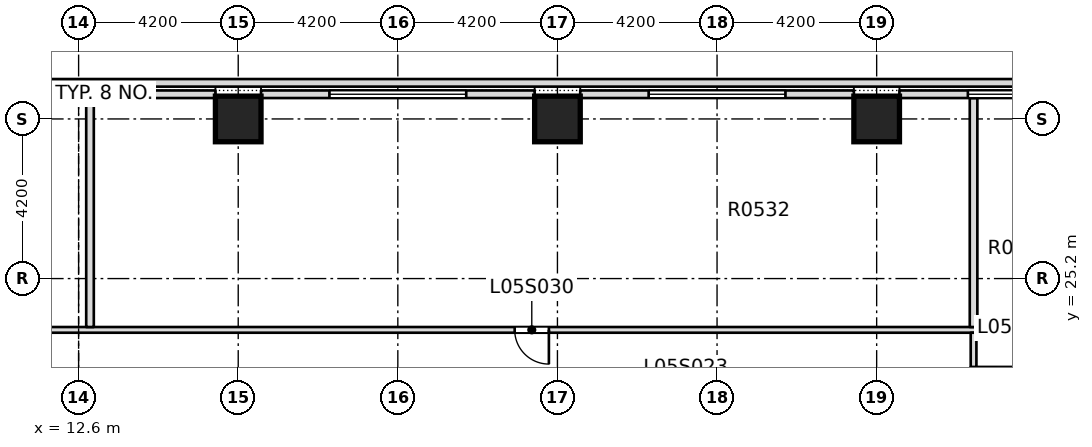
"""IFC4 building model, lengths in metres.
Left out: names, types, materials, properties, quantities, classifications, styles, units other than length and angle.
Written with IfcOpenShell. Run it as: python <this file> out.ifc"""

import sys

from ifc_helpers import new_model, si_unit, direction, frame, frame_2d, origin, origin_2d, place, context, subcontext, project, spatial, rectangle, extrude, element, fill, save


model = new_model("IFC4")
c1 = context("Model", 3, precision=1e-05, world=origin(), true_north=direction((0.0, 1.0)))
c2 = subcontext(c1, "Body", "Model", "MODEL_VIEW")
j1 = project(units=[si_unit("LENGTHUNIT", "METRE"), si_unit("PLANEANGLEUNIT", "RADIAN")], contexts=[c1])
p1 = place(None, origin())
s1 = spatial("IfcSite", under=j1, at=p1, CompositionType="ELEMENT")
p2 = place(p1, origin())
s2 = spatial("IfcBuilding", under=s1, at=p2, CompositionType="ELEMENT")
p3 = place(p2, frame((0.0, 0.0, 30.0)))
s3 = spatial("IfcBuildingStorey", under=s2, at=p3, CompositionType="ELEMENT", Elevation=30.0)
for number, where, z_axis, x_axis in (
    (1, (16.8, 29.4, 0.0), (0.0, 0.0, 1.0), (1.0, 0.0, 0.0)),
    (2, (25.2, 29.4, 0.0), (0.0, 0.0, 1.0), (1.0, 0.0, 0.0)),
    (3, (33.6, 29.4, 0.0), (0.0, 0.0, 1.0), (1.0, 0.0, 0.0)),
):
    element("IfcColumn", number, at=place(p3, frame(where, z_axis=z_axis, x_axis=x_axis)), inside=s3, PredefinedType="COLUMN", context=c2, shape_type="SweptSolid", body=[
        extrude(rectangle(XDim=1.2, YDim=1.2, at=origin_2d()), origin(), (0.0, 0.0, 1.0), 4.18),
    ])
p4 = place(p3, frame((-26.25, 30.35, 4.5), z_axis=(0.0, 0.0, 1.0), x_axis=(1.0, 0.0, 0.0)))
e4 = element("IfcWall", 4, at=p4, inside=s3, PredefinedType="PARAPET", context=c2, shape_type="SweptSolid", body=[
    extrude(rectangle(XDim=69.3, YDim=0.2, at=frame_2d((34.65, 0.0))), origin(), (0.0, 0.0, 1.0), 1.2),
])
p5 = place(p3, frame((36.075, 22.8, 0.0), z_axis=(0.0, 0.0, 1.0), x_axis=(1.0, 0.0, 0.0)))
e5 = element("IfcWall", 5, at=p5, inside=s3, PredefinedType="PARTITIONING", context=c2, shape_type="SweptSolid", body=[
    extrude(rectangle(XDim=6.475, YDim=0.15, at=frame_2d((3.238, 0.0))), origin(), (0.0, 0.0, 1.0), 4.18),
])
p6 = place(p5, frame((0.675, 0.0, 0.0)))
e6 = element("IfcOpeningElement", 6, at=p6, cuts=e5, PredefinedType="OPENING", context=c2, shape_type="SweptSolid", body=[
    extrude(rectangle(XDim=1.2, YDim=2.1, at=frame_2d((0.6, 1.05))), frame((0.0, 0.085, 0.0), z_axis=(0.0, -1.0, 0.0), x_axis=(1.0, 0.0, 0.0)), (0.0, 0.0, 1.0), 0.17),
])
p7 = place(p3, frame((8.65, 23.85, 0.0), z_axis=(0.0, 0.0, 1.0), x_axis=(1.0, 0.0, 0.0)))
e7 = element("IfcWall", 7, at=p7, inside=s3, PredefinedType="PARTITIONING", context=c2, shape_type="SweptSolid", body=[
    extrude(rectangle(XDim=27.6, YDim=0.15, at=frame_2d((13.8, 0.0))), origin(), (0.0, 0.0, 1.0), 4.18),
])
p8 = place(p7, frame((1.7, 0.0, 0.0)))
e8 = element("IfcOpeningElement", 8, at=p8, cuts=e7, PredefinedType="OPENING", context=c2, shape_type="SweptSolid", body=[
    extrude(rectangle(XDim=0.9, YDim=2.1, at=frame_2d((0.45, 1.05))), frame((0.0, 0.085, 0.0), z_axis=(0.0, -1.0, 0.0), x_axis=(1.0, 0.0, 0.0)), (0.0, 0.0, 1.0), 0.17),
])
p9 = place(p7, frame((15.425, 0.0, 0.0)))
e9 = element("IfcOpeningElement", 9, at=p9, cuts=e7, PredefinedType="OPENING", context=c2, shape_type="SweptSolid", body=[
    extrude(rectangle(XDim=0.9, YDim=2.1, at=frame_2d((0.45, 1.05))), frame((0.0, 0.085, 0.0), z_axis=(0.0, -1.0, 0.0), x_axis=(1.0, 0.0, 0.0)), (0.0, 0.0, 1.0), 0.17),
])
p10 = place(p3, frame((12.9, 23.925, 0.0), z_axis=(0.0, 0.0, 1.0), x_axis=(0.0, 1.0, 0.0)))
e10 = element("IfcWall", 10, at=p10, inside=s3, PredefinedType="PARTITIONING", context=c2, shape_type="SweptSolid", body=[
    extrude(rectangle(XDim=6.025, YDim=0.2, at=frame_2d((3.012, 0.0))), origin(), (0.0, 0.0, 1.0), 4.18),
])
p11 = place(p3, frame((36.15, 22.875, 0.0), z_axis=(0.0, 0.0, 1.0), x_axis=(0.0, 1.0, 0.0)))
e11 = element("IfcWall", 11, at=p11, inside=s3, PredefinedType="PARTITIONING", context=c2, shape_type="SweptSolid", body=[
    extrude(rectangle(XDim=0.9, YDim=0.15, at=frame_2d((0.45, 0.0))), origin(), (0.0, 0.0, 1.0), 4.18),
])
p12 = place(p3, frame((36.15, 23.925, 0.0), z_axis=(0.0, 0.0, 1.0), x_axis=(0.0, 1.0, 0.0)))
e12 = element("IfcWall", 12, at=p12, inside=s3, PredefinedType="PARTITIONING", context=c2, shape_type="SweptSolid", body=[
    extrude(rectangle(XDim=6.025, YDim=0.2, at=frame_2d((3.012, 0.0))), origin(), (0.0, 0.0, 1.0), 4.18),
])
p13 = place(p3, frame((41.4, 30.05, 0.0), z_axis=(0.0, 0.0, 1.0), x_axis=(-1.0, 0.0, 0.0)))
e13 = element("IfcWall", 13, at=p13, inside=s3, PredefinedType="STANDARD", context=c2, shape_type="SweptSolid", body=[
    extrude(rectangle(XDim=7.2, YDim=0.2, at=frame_2d((3.6, 0.0))), origin(), (0.0, 0.0, 1.0), 4.18),
])
p14 = place(p13, frame((1.8, 0.0, 0.9)))
e14 = element("IfcOpeningElement", 14, at=p14, cuts=e13, PredefinedType="OPENING", context=c2, shape_type="SweptSolid", body=[
    extrude(rectangle(XDim=3.6, YDim=2.4, at=frame_2d((1.8, 1.2))), frame((0.0, 0.11, 0.0), z_axis=(0.0, -1.0, 0.0), x_axis=(1.0, 0.0, 0.0)), (0.0, 0.0, 1.0), 0.22),
])
p15 = place(p3, frame((33.0, 30.05, 0.0), z_axis=(0.0, 0.0, 1.0), x_axis=(-1.0, 0.0, 0.0)))
e15 = element("IfcWall", 15, at=p15, inside=s3, PredefinedType="STANDARD", context=c2, shape_type="SweptSolid", body=[
    extrude(rectangle(XDim=7.2, YDim=0.2, at=frame_2d((3.6, 0.0))), origin(), (0.0, 0.0, 1.0), 4.18),
])
p16 = place(p15, frame((1.8, 0.0, 0.9)))
e16 = element("IfcOpeningElement", 16, at=p16, cuts=e15, PredefinedType="OPENING", context=c2, shape_type="SweptSolid", body=[
    extrude(rectangle(XDim=3.6, YDim=2.4, at=frame_2d((1.8, 1.2))), frame((0.0, 0.11, 0.0), z_axis=(0.0, -1.0, 0.0), x_axis=(1.0, 0.0, 0.0)), (0.0, 0.0, 1.0), 0.22),
])
p17 = place(p3, frame((24.6, 30.05, 0.0), z_axis=(0.0, 0.0, 1.0), x_axis=(-1.0, 0.0, 0.0)))
e17 = element("IfcWall", 17, at=p17, inside=s3, PredefinedType="STANDARD", context=c2, shape_type="SweptSolid", body=[
    extrude(rectangle(XDim=7.2, YDim=0.2, at=frame_2d((3.6, 0.0))), origin(), (0.0, 0.0, 1.0), 4.18),
])
p18 = place(p17, frame((1.8, 0.0, 0.9)))
e18 = element("IfcOpeningElement", 18, at=p18, cuts=e17, PredefinedType="OPENING", context=c2, shape_type="SweptSolid", body=[
    extrude(rectangle(XDim=3.6, YDim=2.4, at=frame_2d((1.8, 1.2))), frame((0.0, 0.11, 0.0), z_axis=(0.0, -1.0, 0.0), x_axis=(1.0, 0.0, 0.0)), (0.0, 0.0, 1.0), 0.22),
])
p19 = place(p3, frame((16.2, 30.05, 0.0), z_axis=(0.0, 0.0, 1.0), x_axis=(-1.0, 0.0, 0.0)))
e19 = element("IfcWall", 19, at=p19, inside=s3, PredefinedType="STANDARD", context=c2, shape_type="SweptSolid", body=[
    extrude(rectangle(XDim=7.2, YDim=0.2, at=frame_2d((3.6, 0.0))), origin(), (0.0, 0.0, 1.0), 4.18),
])
p20 = place(p19, frame((1.8, 0.0, 0.9)))
e20 = element("IfcOpeningElement", 20, at=p20, cuts=e19, PredefinedType="OPENING", context=c2, shape_type="SweptSolid", body=[
    extrude(rectangle(XDim=3.6, YDim=2.4, at=frame_2d((1.8, 1.2))), frame((0.0, 0.11, 0.0), z_axis=(0.0, -1.0, 0.0), x_axis=(1.0, 0.0, 0.0)), (0.0, 0.0, 1.0), 0.22),
])
p21 = place(p9, origin())
e21 = element("IfcDoor", 21, at=p21, inside=s3, OperationType="SINGLE_SWING_LEFT", PredefinedType="DOOR", context=c2, shape_type="SweptSolid", body=[
    extrude(rectangle(XDim=0.9, YDim=2.1, at=frame_2d((0.45, 1.05))), frame((0.0, 0.025, 0.0), z_axis=(0.0, -1.0, 0.0), x_axis=(1.0, 0.0, 0.0)), (0.0, 0.0, 1.0), 0.05),
])
fill(e9, e21)
p22 = place(p14, origin())
e22 = element("IfcWindow", 22, at=p22, inside=s3, PartitioningType="SINGLE_PANEL", PredefinedType="WINDOW", context=c2, shape_type="SweptSolid", body=[
    extrude(rectangle(XDim=3.6, YDim=2.4, at=frame_2d((1.8, 1.2))), frame((0.0, 0.03, 0.0), z_axis=(0.0, -1.0, 0.0), x_axis=(1.0, 0.0, 0.0)), (0.0, 0.0, 1.0), 0.06),
])
fill(e14, e22)
p23 = place(p16, origin())
e23 = element("IfcWindow", 23, at=p23, inside=s3, PartitioningType="SINGLE_PANEL", PredefinedType="WINDOW", context=c2, shape_type="SweptSolid", body=[
    extrude(rectangle(XDim=3.6, YDim=2.4, at=frame_2d((1.8, 1.2))), frame((0.0, 0.03, 0.0), z_axis=(0.0, -1.0, 0.0), x_axis=(1.0, 0.0, 0.0)), (0.0, 0.0, 1.0), 0.06),
])
fill(e16, e23)
p24 = place(p18, origin())
e24 = element("IfcWindow", 24, at=p24, inside=s3, PartitioningType="SINGLE_PANEL", PredefinedType="WINDOW", context=c2, shape_type="SweptSolid", body=[
    extrude(rectangle(XDim=3.6, YDim=2.4, at=frame_2d((1.8, 1.2))), frame((0.0, 0.03, 0.0), z_axis=(0.0, -1.0, 0.0), x_axis=(1.0, 0.0, 0.0)), (0.0, 0.0, 1.0), 0.06),
])
fill(e18, e24)
p25 = place(p20, origin())
e25 = element("IfcWindow", 25, at=p25, inside=s3, PartitioningType="SINGLE_PANEL", PredefinedType="WINDOW", context=c2, shape_type="SweptSolid", body=[
    extrude(rectangle(XDim=3.6, YDim=2.4, at=frame_2d((1.8, 1.2))), frame((0.0, 0.03, 0.0), z_axis=(0.0, -1.0, 0.0), x_axis=(1.0, 0.0, 0.0)), (0.0, 0.0, 1.0), 0.06),
])
fill(e20, e25)
save(model, sys.argv[1])
